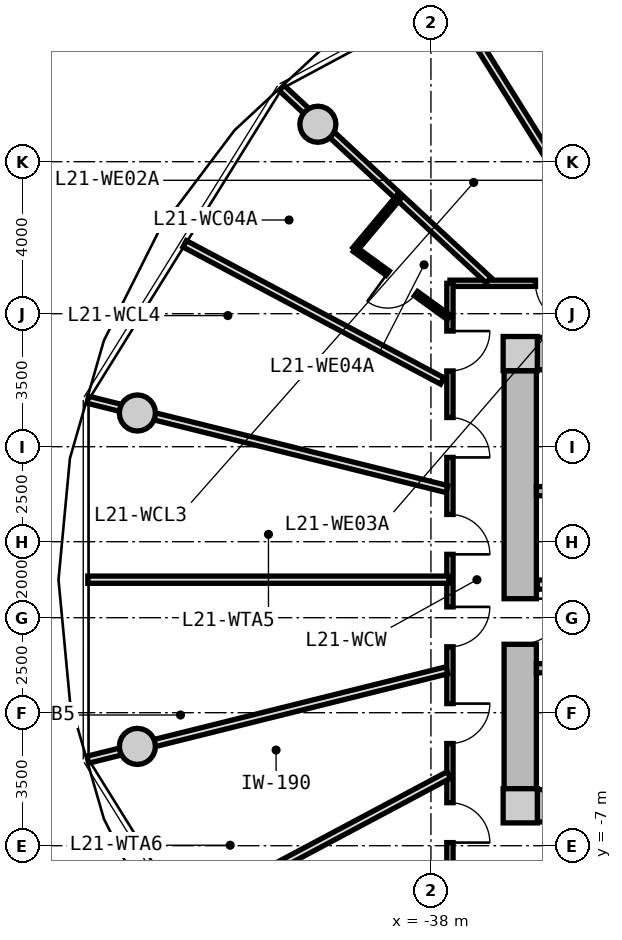
"""IFC4 building model, lengths in metres.
Left out: names, types, materials, properties, quantities, classifications, styles, units other than length and angle.
Written with IfcOpenShell. Run it as: python <this file> out.ifc"""

import sys

from ifc_helpers import new_model, si_unit, direction, frame, frame_2d, origin, origin_2d, place, context, subcontext, project, spatial, rectangle, circle, extrude, source, transform, mapped, element, fill, save


model = new_model("IFC4")
c1 = context("Model", 3, precision=1e-05, world=origin(), true_north=direction((0.0, 1.0)))
c2 = subcontext(c1, "Body", "Model", "MODEL_VIEW")
j1 = project(units=[si_unit("LENGTHUNIT", "METRE"), si_unit("PLANEANGLEUNIT", "RADIAN")], contexts=[c1])
p1 = place(None, origin())
s1 = spatial("IfcSite", under=j1, at=p1, CompositionType="ELEMENT")
p2 = place(p1, origin())
s2 = spatial("IfcBuilding", under=s1, at=p2, CompositionType="ELEMENT")
p3 = place(p2, frame((0.0, 0.0, 70.4)))
s3 = spatial("IfcBuildingStorey", under=s2, at=p3, CompositionType="ELEMENT", Elevation=70.4)
m1 = source(origin(), c2, "Body", "SweptSolid", [
    extrude(rectangle(XDim=0.9, YDim=0.9, at=origin_2d()), origin(), (0.0, 0.0, 1.0), 3.05),
])
for number, where, z_axis, x_axis in (
    (1, (-35.65, -5.95, 0.0), (0.0, 0.0, 1.0), (1.0, 0.0, 0.0)),
    (2, (-35.65, 5.95, 0.0), (0.0, 0.0, 1.0), (1.0, 0.0, 0.0)),
):
    element("IfcColumn", number, at=place(p3, frame(where, z_axis=z_axis, x_axis=x_axis)), inside=s3, PredefinedType="COLUMN", context=c2, shape_type="MappedRepresentation", body=[
        mapped(m1, transform((0.0, 0.0, 0.0), x_axis=(1.0, 0.0, 0.0), y_axis=(0.0, 1.0, 0.0), z_axis=(0.0, 0.0, 1.0), scale=1.0)),
    ])
m2 = source(origin(), c2, "Body", "SweptSolid", [
    extrude(rectangle(XDim=14.4, YDim=0.85, at=frame_2d((7.2, 0.0))), origin(), (0.0, 0.0, 1.0), 2.73),
])
for number, where, z_axis, x_axis in (
    (3, (-35.2, 5.95, 0.0), (0.0, 0.0, 1.0), (1.0, 0.0, 0.0)),
    (4, (-20.8, -5.95, 0.0), (0.0, 0.0, 1.0), (-1.0, 0.0, 0.0)),
):
    element("IfcWall", number, at=place(p3, frame(where, z_axis=z_axis, x_axis=x_axis)), inside=s3, PredefinedType="SHEAR", context=c2, shape_type="MappedRepresentation", body=[
        mapped(m2, transform((0.0, 0.0, 0.0), x_axis=(1.0, 0.0, 0.0), y_axis=(0.0, 1.0, 0.0), z_axis=(0.0, 0.0, 1.0), scale=1.0)),
    ])
m3 = source(origin(), c2, "Body", "SweptSolid", [
    extrude(rectangle(XDim=11.0, YDim=0.85, at=frame_2d((5.5, 0.0))), origin(), (0.0, 0.0, 1.0), 2.73),
])
p4 = place(p3, frame((-35.65, -5.5, 0.0), z_axis=(0.0, 0.0, 1.0), x_axis=(0.0, 1.0, 0.0)))
e5 = element("IfcWall", 5, at=p4, inside=s3, PredefinedType="SHEAR", context=c2, shape_type="MappedRepresentation", body=[
    mapped(m3, transform((0.0, 0.0, 0.0), x_axis=(1.0, 0.0, 0.0), y_axis=(0.0, 1.0, 0.0), z_axis=(0.0, 0.0, 1.0), scale=1.0)),
])
p5 = place(p4, frame((3.8, 0.0, 0.0)))
e6 = element("IfcOpeningElement", 6, at=p5, cuts=e5, PredefinedType="OPENING", context=c2, shape_type="SweptSolid", body=[
    extrude(rectangle(XDim=1.2, YDim=2.15, at=frame_2d((0.6, 1.075))), frame((0.0, 0.435, 0.0), z_axis=(0.0, -1.0, 0.0), x_axis=(1.0, 0.0, 0.0)), (0.0, 0.0, 1.0), 0.87),
])
m4 = source(origin(), c2, "Body", "SweptSolid", [
    extrude(circle(Radius=0.475, at=origin_2d()), origin(), (0.0, 0.0, 1.0), 3.05),
])
for number, where, z_axis, x_axis in (
    (7, (-40.975, 11.985, 0.0), (0.0, 0.0, 1.0), (1.0, 0.0, 0.0)),
    (8, (-45.725, 4.387, 0.0), (0.0, 0.0, 1.0), (1.0, 0.0, 0.0)),
    (9, (-45.725, -4.387, 0.0), (0.0, 0.0, 1.0), (1.0, 0.0, 0.0)),
):
    element("IfcColumn", number, at=place(p3, frame(where, z_axis=z_axis, x_axis=x_axis)), inside=s3, PredefinedType="COLUMN", context=c2, shape_type="MappedRepresentation", body=[
        mapped(m4, transform((0.0, 0.0, 0.0), x_axis=(1.0, 0.0, 0.0), y_axis=(0.0, 1.0, 0.0), z_axis=(0.0, 0.0, 1.0), scale=1.0)),
    ])
m5 = source(origin(), c2, "Body", "SweptSolid", [
    extrude(rectangle(XDim=7.765, YDim=0.24, at=frame_2d((3.883, 0.0))), origin(), (0.0, 0.0, 1.0), 2.73),
])
p6 = place(p3, frame((-35.225, 2.33, 0.0), z_axis=(0.0, 0.0, 1.0), x_axis=(1.0, 0.0, 0.0)))
e10 = element("IfcWall", 10, at=p6, inside=s3, PredefinedType="PARTITIONING", context=c2, shape_type="MappedRepresentation", body=[
    mapped(m5, transform((0.0, 0.0, 0.0), x_axis=(1.0, 0.0, 0.0), y_axis=(0.0, 1.0, 0.0), z_axis=(0.0, 0.0, 1.0), scale=1.0)),
])
p7 = place(p3, frame((-35.225, -2.33, 0.0), z_axis=(0.0, 0.0, 1.0), x_axis=(1.0, 0.0, 0.0)))
e11 = element("IfcWall", 11, at=p7, inside=s3, PredefinedType="PARTITIONING", context=c2, shape_type="MappedRepresentation", body=[
    mapped(m5, transform((0.0, 0.0, 0.0), x_axis=(1.0, 0.0, 0.0), y_axis=(0.0, 1.0, 0.0), z_axis=(0.0, 0.0, 1.0), scale=1.0)),
])
p8 = place(p7, frame((0.885, 0.0, 0.0)))
e12 = element("IfcOpeningElement", 12, at=p8, cuts=e11, PredefinedType="OPENING", context=c2, shape_type="SweptSolid", body=[
    extrude(rectangle(XDim=1.1, YDim=2.15, at=frame_2d((0.55, 1.075))), frame((0.0, 0.13, 0.0), z_axis=(0.0, -1.0, 0.0), x_axis=(1.0, 0.0, 0.0)), (0.0, 0.0, 1.0), 0.26),
])
m6 = source(origin(), c2, "Body", "SweptSolid", [
    extrude(rectangle(XDim=7.62, YDim=0.24, at=frame_2d((3.81, 0.0))), origin(), (0.0, 0.0, 1.0), 2.715),
])
p9 = place(p3, frame((-35.2, -0.13, 0.0), z_axis=(0.0, 0.0, 1.0), x_axis=(1.0, 0.0, 0.0)))
e13 = element("IfcWall", 13, at=p9, inside=s3, PredefinedType="PARTITIONING", context=c2, shape_type="MappedRepresentation", body=[
    mapped(m6, transform((0.0, 0.0, 0.0), x_axis=(1.0, 0.0, 0.0), y_axis=(0.0, 1.0, 0.0), z_axis=(0.0, 0.0, 1.0), scale=1.0)),
])
p10 = place(p9, frame((6.22, 0.0, 0.0)))
e14 = element("IfcOpeningElement", 14, at=p10, cuts=e13, PredefinedType="OPENING", context=c2, shape_type="SweptSolid", body=[
    extrude(rectangle(XDim=1.0, YDim=2.1, at=frame_2d((0.5, 1.05))), frame((0.0, 0.13, 0.0), z_axis=(0.0, -1.0, 0.0), x_axis=(1.0, 0.0, 0.0)), (0.0, 0.0, 1.0), 0.26),
])
p11 = place(p9, frame((0.85, 0.0, 0.0)))
e15 = element("IfcOpeningElement", 15, at=p11, cuts=e13, PredefinedType="OPENING", context=c2, shape_type="SweptSolid", body=[
    extrude(rectangle(XDim=1.1, YDim=2.2, at=frame_2d((0.55, 1.1))), frame((0.0, 0.13, 0.0), z_axis=(0.0, -1.0, 0.0), x_axis=(1.0, 0.0, 0.0)), (0.0, 0.0, 1.0), 0.26),
])
p12 = place(p9, frame((3.85, 0.0, 0.0)))
e16 = element("IfcOpeningElement", 16, at=p12, cuts=e13, PredefinedType="OPENING", context=c2, shape_type="SweptSolid", body=[
    extrude(rectangle(XDim=1.1, YDim=2.2, at=frame_2d((0.55, 1.1))), frame((0.0, 0.13, 0.0), z_axis=(0.0, -1.0, 0.0), x_axis=(1.0, 0.0, 0.0)), (0.0, 0.0, 1.0), 0.26),
])
m7 = source(origin(), c2, "Body", "SweptSolid", [
    extrude(rectangle(XDim=19.0, YDim=0.165, at=frame_2d((9.5, 0.0))), origin(), (0.0, 0.0, 1.0), 2.715),
])
p13 = place(p3, frame((-37.5, 7.8, 0.0), z_axis=(0.0, 0.0, 1.0), x_axis=(1.0, 0.0, 0.0)))
e17 = element("IfcWall", 17, at=p13, inside=s3, PredefinedType="PARTITIONING", context=c2, shape_type="MappedRepresentation", body=[
    mapped(m7, transform((0.0, 0.0, 0.0), x_axis=(1.0, 0.0, 0.0), y_axis=(0.0, 1.0, 0.0), z_axis=(0.0, 0.0, 1.0), scale=1.0)),
])
p14 = place(p13, frame((14.653, 0.0, 0.0)))
e18 = element("IfcOpeningElement", 18, at=p14, cuts=e17, PredefinedType="OPENING", context=c2, shape_type="SweptSolid", body=[
    extrude(rectangle(XDim=1.05, YDim=2.15, at=frame_2d((0.525, 1.075))), frame((0.0, 0.093, 0.0), z_axis=(0.0, -1.0, 0.0), x_axis=(1.0, 0.0, 0.0)), (0.0, 0.0, 1.0), 0.185),
])
p15 = place(p13, frame((12.5, 0.0, 0.0)))
e19 = element("IfcOpeningElement", 19, at=p15, cuts=e17, PredefinedType="OPENING", context=c2, shape_type="SweptSolid", body=[
    extrude(rectangle(XDim=1.05, YDim=2.15, at=frame_2d((0.525, 1.075))), frame((0.0, 0.093, 0.0), z_axis=(0.0, -1.0, 0.0), x_axis=(1.0, 0.0, 0.0)), (0.0, 0.0, 1.0), 0.185),
])
p16 = place(p13, frame((9.352, 0.0, 0.0)))
e20 = element("IfcOpeningElement", 20, at=p16, cuts=e17, PredefinedType="OPENING", context=c2, shape_type="SweptSolid", body=[
    extrude(rectangle(XDim=1.05, YDim=2.15, at=frame_2d((0.525, 1.075))), frame((0.0, 0.093, 0.0), z_axis=(0.0, -1.0, 0.0), x_axis=(1.0, 0.0, 0.0)), (0.0, 0.0, 1.0), 0.185),
])
p17 = place(p13, frame((7.806, 0.0, 0.0)))
e21 = element("IfcOpeningElement", 21, at=p17, cuts=e17, PredefinedType="OPENING", context=c2, shape_type="SweptSolid", body=[
    extrude(rectangle(XDim=1.05, YDim=2.15, at=frame_2d((0.525, 1.075))), frame((0.0, 0.093, 0.0), z_axis=(0.0, -1.0, 0.0), x_axis=(1.0, 0.0, 0.0)), (0.0, 0.0, 1.0), 0.185),
])
p18 = place(p13, frame((4.773, 0.0, 0.0)))
e22 = element("IfcOpeningElement", 22, at=p18, cuts=e17, PredefinedType="OPENING", context=c2, shape_type="SweptSolid", body=[
    extrude(rectangle(XDim=1.05, YDim=2.15, at=frame_2d((0.525, 1.075))), frame((0.0, 0.093, 0.0), z_axis=(0.0, -1.0, 0.0), x_axis=(1.0, 0.0, 0.0)), (0.0, 0.0, 1.0), 0.185),
])
p19 = place(p13, frame((2.251, 0.0, 0.0)))
e23 = element("IfcOpeningElement", 23, at=p19, cuts=e17, PredefinedType="OPENING", context=c2, shape_type="SweptSolid", body=[
    extrude(rectangle(XDim=1.05, YDim=2.15, at=frame_2d((0.525, 1.075))), frame((0.0, 0.093, 0.0), z_axis=(0.0, -1.0, 0.0), x_axis=(1.0, 0.0, 0.0)), (0.0, 0.0, 1.0), 0.185),
])
m8 = source(origin(), c2, "Body", "SweptSolid", [
    extrude(rectangle(XDim=15.6, YDim=0.165, at=frame_2d((7.8, 0.0))), origin(), (0.0, 0.0, 1.0), 2.715),
])
p20 = place(p3, frame((-37.5, -7.8, 0.0), z_axis=(0.0, 0.0, 1.0), x_axis=(0.0, 1.0, 0.0)))
e24 = element("IfcWall", 24, at=p20, inside=s3, PredefinedType="PARTITIONING", context=c2, shape_type="MappedRepresentation", body=[
    mapped(m8, transform((0.0, 0.0, 0.0), x_axis=(1.0, 0.0, 0.0), y_axis=(0.0, 1.0, 0.0), z_axis=(0.0, 0.0, 1.0), scale=1.0)),
])
p21 = place(p20, frame((3.489, 0.0, 0.0)))
e25 = element("IfcOpeningElement", 25, at=p21, cuts=e24, PredefinedType="OPENING", context=c2, shape_type="SweptSolid", body=[
    extrude(rectangle(XDim=1.05, YDim=2.15, at=frame_2d((0.525, 1.075))), frame((0.0, 0.093, 0.0), z_axis=(0.0, -1.0, 0.0), x_axis=(1.0, 0.0, 0.0)), (0.0, 0.0, 1.0), 0.185),
])
p22 = place(p20, frame((0.882, 0.0, 0.0)))
e26 = element("IfcOpeningElement", 26, at=p22, cuts=e24, PredefinedType="OPENING", context=c2, shape_type="SweptSolid", body=[
    extrude(rectangle(XDim=1.05, YDim=2.15, at=frame_2d((0.525, 1.075))), frame((0.0, 0.093, 0.0), z_axis=(0.0, -1.0, 0.0), x_axis=(1.0, 0.0, 0.0)), (0.0, 0.0, 1.0), 0.185),
])
p23 = place(p20, frame((13.293, 0.0, 0.0)))
e27 = element("IfcOpeningElement", 27, at=p23, cuts=e24, PredefinedType="OPENING", context=c2, shape_type="SweptSolid", body=[
    extrude(rectangle(XDim=1.05, YDim=2.15, at=frame_2d((0.525, 1.075))), frame((0.0, 0.093, 0.0), z_axis=(0.0, -1.0, 0.0), x_axis=(1.0, 0.0, 0.0)), (0.0, 0.0, 1.0), 0.185),
])
p24 = place(p20, frame((11.018, 0.0, 0.0)))
e28 = element("IfcOpeningElement", 28, at=p24, cuts=e24, PredefinedType="OPENING", context=c2, shape_type="SweptSolid", body=[
    extrude(rectangle(XDim=1.05, YDim=2.15, at=frame_2d((0.525, 1.075))), frame((0.0, 0.093, 0.0), z_axis=(0.0, -1.0, 0.0), x_axis=(1.0, 0.0, 0.0)), (0.0, 0.0, 1.0), 0.185),
])
p25 = place(p20, frame((8.467, 0.0, 0.0)))
e29 = element("IfcOpeningElement", 29, at=p25, cuts=e24, PredefinedType="OPENING", context=c2, shape_type="SweptSolid", body=[
    extrude(rectangle(XDim=1.05, YDim=2.15, at=frame_2d((0.525, 1.075))), frame((0.0, 0.093, 0.0), z_axis=(0.0, -1.0, 0.0), x_axis=(1.0, 0.0, 0.0)), (0.0, 0.0, 1.0), 0.185),
])
p26 = place(p20, frame((6.035, 0.0, 0.0)))
e30 = element("IfcOpeningElement", 30, at=p26, cuts=e24, PredefinedType="OPENING", context=c2, shape_type="SweptSolid", body=[
    extrude(rectangle(XDim=1.05, YDim=2.15, at=frame_2d((0.525, 1.075))), frame((0.0, 0.093, 0.0), z_axis=(0.0, -1.0, 0.0), x_axis=(1.0, 0.0, 0.0)), (0.0, 0.0, 1.0), 0.185),
])
m9 = source(origin(), c2, "Body", "SweptSolid", [
    extrude(rectangle(XDim=9.737, YDim=0.19, at=frame_2d((4.869, 0.0))), origin(), (0.0, 0.0, 1.0), 2.165),
])
p27 = place(p3, frame((-37.58, -2.385, 0.0), z_axis=(0.0, 0.0, 1.0), x_axis=(-0.970392716238, -0.241532557375, 0.0)))
e31 = element("IfcWall", 31, at=p27, inside=s3, PredefinedType="PARTITIONING", context=c2, shape_type="MappedRepresentation", body=[
    mapped(m9, transform((0.0, 0.0, 0.0), x_axis=(1.0, 0.0, 0.0), y_axis=(0.0, 1.0, 0.0), z_axis=(0.0, 0.0, 1.0), scale=1.0)),
])
m10 = source(origin(), c2, "Body", "SweptSolid", [
    extrude(rectangle(XDim=7.873, YDim=0.19, at=frame_2d((3.937, 0.0))), origin(), (0.0, 0.0, 1.0), 2.715),
])
p28 = place(p3, frame((-37.53, -5.138, 0.0), z_axis=(0.0, 0.0, 1.0), x_axis=(-0.882666052726, -0.470000680175, 0.0)))
e32 = element("IfcWall", 32, at=p28, inside=s3, PredefinedType="PARTITIONING", context=c2, shape_type="MappedRepresentation", body=[
    mapped(m10, transform((0.0, 0.0, 0.0), x_axis=(1.0, 0.0, 0.0), y_axis=(0.0, 1.0, 0.0), z_axis=(0.0, 0.0, 1.0), scale=1.0)),
])
m11 = source(origin(), c2, "Body", "SweptSolid", [
    extrude(rectangle(XDim=7.435, YDim=0.19, at=frame_2d((3.717, 0.0))), origin(), (0.0, 0.0, 1.0), 2.165),
])
p29 = place(p3, frame((-36.483, 7.88, 0.0), z_axis=(0.0, 0.0, 1.0), x_axis=(-0.732651956848, 0.680603489652, 0.0)))
e33 = element("IfcWall", 33, at=p29, inside=s3, PredefinedType="PARTITIONING", context=c2, shape_type="MappedRepresentation", body=[
    mapped(m11, transform((0.0, 0.0, 0.0), x_axis=(1.0, 0.0, 0.0), y_axis=(0.0, 1.0, 0.0), z_axis=(0.0, 0.0, 1.0), scale=1.0)),
])
m12 = source(origin(), c2, "Body", "SweptSolid", [
    extrude(rectangle(XDim=8.598, YDim=0.19, at=frame_2d((4.299, 0.0))), origin(), (0.0, 0.0, 1.0), 2.715),
])
p30 = place(p3, frame((-32.957, 8.017, 0.0), z_axis=(0.0, 0.0, 1.0), x_axis=(-0.530039776395, 0.847972779893, 0.0)))
e34 = element("IfcWall", 34, at=p30, inside=s3, PredefinedType="PARTITIONING", context=c2, shape_type="MappedRepresentation", body=[
    mapped(m12, transform((0.0, 0.0, 0.0), x_axis=(1.0, 0.0, 0.0), y_axis=(0.0, 1.0, 0.0), z_axis=(0.0, 0.0, 1.0), scale=1.0)),
])
p31 = place(p3, frame((-37.58, 2.385, 0.0), z_axis=(0.0, 0.0, 1.0), x_axis=(-0.970392716238, 0.241532557375, 0.0)))
e35 = element("IfcWall", 35, at=p31, inside=s3, PredefinedType="PARTITIONING", context=c2, shape_type="MappedRepresentation", body=[
    mapped(m9, transform((0.0, 0.0, 0.0), x_axis=(1.0, 0.0, 0.0), y_axis=(0.0, 1.0, 0.0), z_axis=(0.0, 0.0, 1.0), scale=1.0)),
])
m13 = source(origin(), c2, "Body", "SweptSolid", [
    extrude(rectangle(XDim=7.677, YDim=0.19, at=frame_2d((3.838, 0.0))), origin(), (0.0, 0.0, 1.0), 2.715),
])
p32 = place(p3, frame((-37.703, 5.231, 0.0), z_axis=(0.0, 0.0, 1.0), x_axis=(-0.882725057546, 0.469889851753, 0.0)))
e36 = element("IfcWall", 36, at=p32, inside=s3, PredefinedType="PARTITIONING", context=c2, shape_type="MappedRepresentation", body=[
    mapped(m13, transform((0.0, 0.0, 0.0), x_axis=(1.0, 0.0, 0.0), y_axis=(0.0, 1.0, 0.0), z_axis=(0.0, 0.0, 1.0), scale=1.0)),
])
m14 = source(origin(), c2, "Body", "SweptSolid", [
    extrude(rectangle(XDim=3.051, YDim=0.14, at=frame_2d((1.525, 0.0))), origin(), (0.0, 0.0, 1.0), 2.715),
])
p33 = place(p3, frame((-37.53, 6.903, 0.0), z_axis=(0.0, 0.0, 1.0), x_axis=(-0.809849031404, 0.586638343729, 0.0)))
e37 = element("IfcWall", 37, at=p33, inside=s3, PredefinedType="PARTITIONING", context=c2, shape_type="MappedRepresentation", body=[
    mapped(m14, transform((0.0, 0.0, 0.0), x_axis=(1.0, 0.0, 0.0), y_axis=(0.0, 1.0, 0.0), z_axis=(0.0, 0.0, 1.0), scale=1.0)),
])
p34 = place(p33, frame((1.065, 0.0, 0.0)))
e38 = element("IfcOpeningElement", 38, at=p34, cuts=e37, PredefinedType="OPENING", context=c2, shape_type="SweptSolid", body=[
    extrude(rectangle(XDim=0.92, YDim=2.1, at=frame_2d((0.46, 1.05))), frame((0.0, 0.08, 0.0), z_axis=(0.0, -1.0, 0.0), x_axis=(1.0, 0.0, 0.0)), (0.0, 0.0, 1.0), 0.16),
])
m15 = source(origin(), c2, "Body", "SweptSolid", [
    extrude(rectangle(XDim=1.84, YDim=0.14, at=frame_2d((0.92, 0.0))), origin(), (0.0, 0.0, 1.0), 2.355),
])
p35 = place(p3, frame((-40.0, 8.692, 0.0), z_axis=(0.0, 0.0, 1.0), x_axis=(0.641410397049, 0.767197955262, 0.0)))
e39 = element("IfcWall", 39, at=p35, inside=s3, PredefinedType="PARTITIONING", context=c2, shape_type="MappedRepresentation", body=[
    mapped(m15, transform((0.0, 0.0, 0.0), x_axis=(1.0, 0.0, 0.0), y_axis=(0.0, 1.0, 0.0), z_axis=(0.0, 0.0, 1.0), scale=1.0)),
])
m16 = source(origin(), c2, "Body", "SweptSolid", [
    extrude(rectangle(XDim=9.499, YDim=0.19, at=frame_2d((4.75, 0.0))), origin(), (0.0, 0.0, 1.0), 2.715),
])
p36 = place(p3, frame((-37.53, 0.0, 0.0), z_axis=(0.0, 0.0, 1.0), x_axis=(-1.0, 0.0, 0.0)))
e40 = element("IfcWall", 40, at=p36, inside=s3, PredefinedType="PARTITIONING", context=c2, shape_type="MappedRepresentation", body=[
    mapped(m16, transform((0.0, 0.0, 0.0), x_axis=(1.0, 0.0, 0.0), y_axis=(0.0, 1.0, 0.0), z_axis=(0.0, 0.0, 1.0), scale=1.0)),
])
m17 = source(origin(), c2, "Body", "SweptSolid", [
    extrude(rectangle(XDim=1.2, YDim=2.15, at=frame_2d((0.6, 1.075))), frame((0.0, 0.025, 0.0), z_axis=(0.0, -1.0, 0.0), x_axis=(1.0, 0.0, 0.0)), (0.0, 0.0, 1.0), 0.05),
])
p37 = place(p5, frame((1.2, 0.0, 0.0), z_axis=(0.0, 0.0, 1.0), x_axis=(-1.0, 0.0, 0.0)))
e41 = element("IfcDoor", 41, at=p37, inside=s3, OperationType="SINGLE_SWING_LEFT", PredefinedType="DOOR", context=c2, shape_type="MappedRepresentation", body=[
    mapped(m17, transform((0.0, 0.0, 0.0), x_axis=(1.0, 0.0, 0.0), y_axis=(0.0, 1.0, 0.0), z_axis=(0.0, 0.0, 1.0), scale=1.0)),
])
fill(e6, e41)
m18 = source(origin(), c2, "Body", "SweptSolid", [
    extrude(rectangle(XDim=1.05, YDim=2.15, at=frame_2d((0.525, 1.075))), frame((0.0, 0.025, 0.0), z_axis=(0.0, -1.0, 0.0), x_axis=(1.0, 0.0, 0.0)), (0.0, 0.0, 1.0), 0.05),
])
p38 = place(p21, frame((1.05, 0.0, 0.0), z_axis=(0.0, 0.0, 1.0), x_axis=(-1.0, 0.0, 0.0)))
e42 = element("IfcDoor", 42, at=p38, inside=s3, OperationType="SINGLE_SWING_LEFT", PredefinedType="DOOR", context=c2, shape_type="MappedRepresentation", body=[
    mapped(m18, transform((0.0, 0.0, 0.0), x_axis=(1.0, 0.0, 0.0), y_axis=(0.0, 1.0, 0.0), z_axis=(0.0, 0.0, 1.0), scale=1.0)),
])
fill(e25, e42)
p39 = place(p22, frame((1.05, 0.0, 0.0), z_axis=(0.0, 0.0, 1.0), x_axis=(-1.0, 0.0, 0.0)))
e43 = element("IfcDoor", 43, at=p39, inside=s3, OperationType="SINGLE_SWING_RIGHT", PredefinedType="DOOR", context=c2, shape_type="MappedRepresentation", body=[
    mapped(m18, transform((0.0, 0.0, 0.0), x_axis=(1.0, 0.0, 0.0), y_axis=(0.0, 1.0, 0.0), z_axis=(0.0, 0.0, 1.0), scale=1.0)),
])
fill(e26, e43)
p40 = place(p19, frame((1.05, 0.0, 0.0), z_axis=(0.0, 0.0, 1.0), x_axis=(-1.0, 0.0, 0.0)))
e44 = element("IfcDoor", 44, at=p40, inside=s3, OperationType="SINGLE_SWING_LEFT", PredefinedType="DOOR", context=c2, shape_type="MappedRepresentation", body=[
    mapped(m18, transform((0.0, 0.0, 0.0), x_axis=(1.0, 0.0, 0.0), y_axis=(0.0, 1.0, 0.0), z_axis=(0.0, 0.0, 1.0), scale=1.0)),
])
fill(e23, e44)
p41 = place(p23, frame((1.05, 0.0, 0.0), z_axis=(0.0, 0.0, 1.0), x_axis=(-1.0, 0.0, 0.0)))
e45 = element("IfcDoor", 45, at=p41, inside=s3, OperationType="SINGLE_SWING_LEFT", PredefinedType="DOOR", context=c2, shape_type="MappedRepresentation", body=[
    mapped(m18, transform((0.0, 0.0, 0.0), x_axis=(1.0, 0.0, 0.0), y_axis=(0.0, 1.0, 0.0), z_axis=(0.0, 0.0, 1.0), scale=1.0)),
])
fill(e27, e45)
m19 = source(origin(), c2, "Body", "SweptSolid", [
    extrude(rectangle(XDim=0.92, YDim=2.1, at=frame_2d((0.46, 1.05))), frame((0.0, 0.025, 0.0), z_axis=(0.0, -1.0, 0.0), x_axis=(1.0, 0.0, 0.0)), (0.0, 0.0, 1.0), 0.05),
])
p42 = place(p34, origin())
e46 = element("IfcDoor", 46, at=p42, inside=s3, OperationType="SINGLE_SWING_RIGHT", PredefinedType="DOOR", context=c2, shape_type="MappedRepresentation", body=[
    mapped(m19, transform((0.0, 0.0, 0.0), x_axis=(1.0, 0.0, 0.0), y_axis=(0.0, 1.0, 0.0), z_axis=(0.0, 0.0, 1.0), scale=1.0)),
])
fill(e38, e46)
p43 = place(p24, frame((1.05, 0.0, 0.0), z_axis=(0.0, 0.0, 1.0), x_axis=(-1.0, 0.0, 0.0)))
e47 = element("IfcDoor", 47, at=p43, inside=s3, OperationType="SINGLE_SWING_RIGHT", PredefinedType="DOOR", context=c2, shape_type="MappedRepresentation", body=[
    mapped(m18, transform((0.0, 0.0, 0.0), x_axis=(1.0, 0.0, 0.0), y_axis=(0.0, 1.0, 0.0), z_axis=(0.0, 0.0, 1.0), scale=1.0)),
])
fill(e28, e47)
p44 = place(p25, frame((1.05, 0.0, 0.0), z_axis=(0.0, 0.0, 1.0), x_axis=(-1.0, 0.0, 0.0)))
e48 = element("IfcDoor", 48, at=p44, inside=s3, OperationType="SINGLE_SWING_RIGHT", PredefinedType="DOOR", context=c2, shape_type="MappedRepresentation", body=[
    mapped(m18, transform((0.0, 0.0, 0.0), x_axis=(1.0, 0.0, 0.0), y_axis=(0.0, 1.0, 0.0), z_axis=(0.0, 0.0, 1.0), scale=1.0)),
])
fill(e29, e48)
p45 = place(p26, frame((1.05, 0.0, 0.0), z_axis=(0.0, 0.0, 1.0), x_axis=(-1.0, 0.0, 0.0)))
e49 = element("IfcDoor", 49, at=p45, inside=s3, OperationType="SINGLE_SWING_LEFT", PredefinedType="DOOR", context=c2, shape_type="MappedRepresentation", body=[
    mapped(m18, transform((0.0, 0.0, 0.0), x_axis=(1.0, 0.0, 0.0), y_axis=(0.0, 1.0, 0.0), z_axis=(0.0, 0.0, 1.0), scale=1.0)),
])
fill(e30, e49)
save(model, sys.argv[1])
